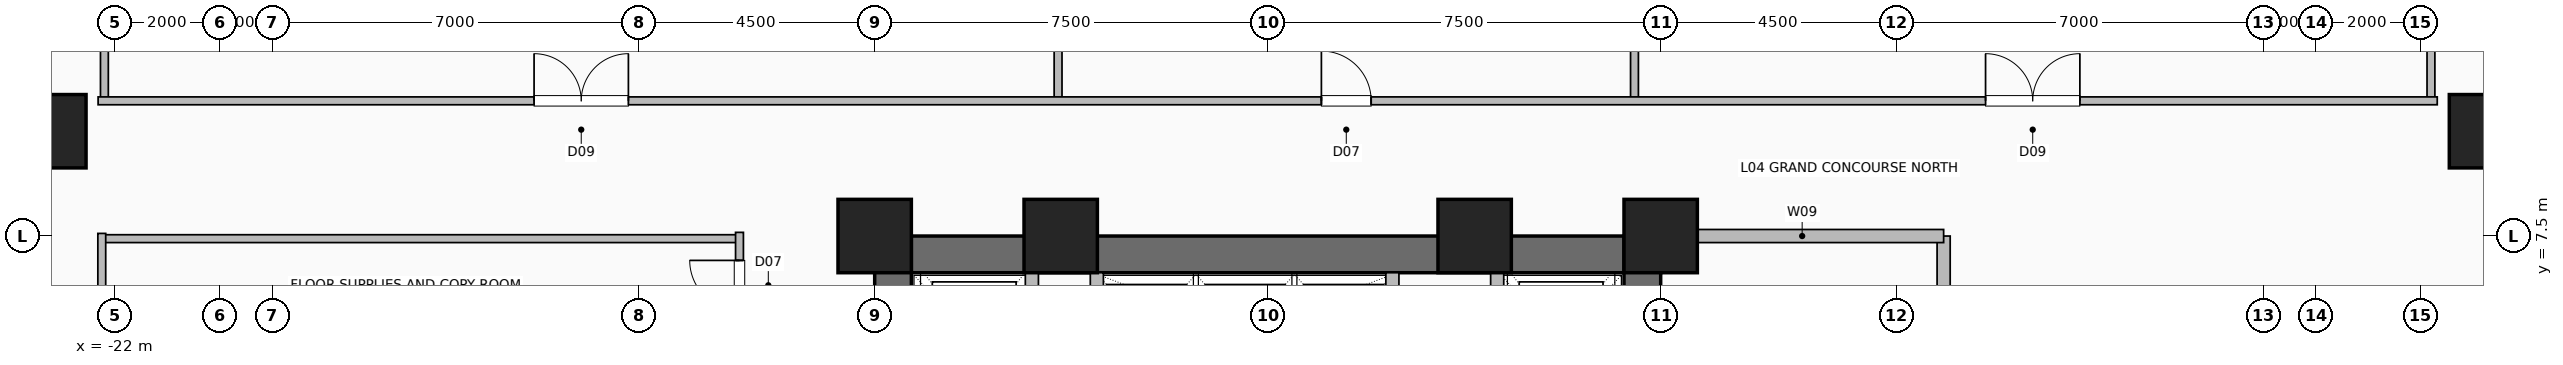
"""IFC4 building model, lengths in metres.
Left out: names, types, materials, properties, quantities, classifications, styles, units other than length and angle.
Written with IfcOpenShell. Run it as: python <this file> out.ifc"""

import sys

from ifc_helpers import new_model, si_unit, direction, frame, frame_2d, origin, origin_2d, place, context, subcontext, project, spatial, rectangle, hollow_rectangle, extrude, element, fill, save


model = new_model("IFC4")
c1 = context("Model", 3, precision=1e-05, world=origin(), true_north=direction((0.0, 1.0)))
c2 = subcontext(c1, "Body", "Model", "MODEL_VIEW")
j1 = project(units=[si_unit("LENGTHUNIT", "METRE"), si_unit("PLANEANGLEUNIT", "RADIAN")], contexts=[c1])
p1 = place(None, origin())
s1 = spatial("IfcSite", under=j1, at=p1, CompositionType="ELEMENT")
p2 = place(p1, origin())
s2 = spatial("IfcBuilding", under=s1, at=p2, CompositionType="ELEMENT")
p3 = place(p2, frame((0.0, 0.0, 21.6)))
s3 = spatial("IfcBuildingStorey", under=s2, at=p3, CompositionType="ELEMENT", Elevation=21.6)
for number, where, z_axis, x_axis in (
    (1, (7.5, 7.5, 0.0), (0.0, 0.0, 1.0), (1.0, 0.0, 0.0)),
    (2, (3.95, 7.5, 0.0), (0.0, 0.0, 1.0), (1.0, 0.0, 0.0)),
    (3, (-3.95, 7.5, 0.0), (0.0, 0.0, 1.0), (1.0, 0.0, 0.0)),
    (4, (-7.5, 7.5, 0.0), (0.0, 0.0, 1.0), (1.0, 0.0, 0.0)),
):
    element("IfcColumn", number, at=place(p3, frame(where, z_axis=z_axis, x_axis=x_axis)), inside=s3, PredefinedType="COLUMN", context=c2, shape_type="SweptSolid", body=[
        extrude(hollow_rectangle(XDim=1.4, YDim=1.4, WallThickness=0.06, at=origin_2d()), origin(), (0.0, 0.0, 1.0), 5.4),
    ])
for number, where, z_axis, x_axis in (
    (5, (-23.25, 9.5, 0.0), (0.0, 0.0, 1.0), (1.0, 0.0, 0.0)),
    (6, (23.25, 9.5, 0.0), (0.0, 0.0, 1.0), (1.0, 0.0, 0.0)),
):
    element("IfcColumn", number, at=place(p3, frame(where, z_axis=z_axis, x_axis=x_axis)), inside=s3, PredefinedType="COLUMN", context=c2, shape_type="SweptSolid", body=[
        extrude(hollow_rectangle(XDim=1.4, YDim=1.4, WallThickness=0.06, at=origin_2d()), origin(), (0.0, 0.0, 1.0), 5.0),
    ])
p4 = place(p3, frame((-7.5, 7.15, 0.0), z_axis=(0.0, 0.0, 1.0), x_axis=(1.0, 0.0, 0.0)))
e7 = element("IfcWall", 7, at=p4, inside=s3, PredefinedType="SHEAR", context=c2, shape_type="SweptSolid", body=[
    extrude(rectangle(XDim=15.0, YDim=0.7, at=frame_2d((7.5, 0.0))), origin(), (0.0, 0.0, 1.0), 5.0),
])
p5 = place(p3, frame((-7.15, -7.5, 0.0), z_axis=(0.0, 0.0, 1.0), x_axis=(0.0, 1.0, 0.0)))
e8 = element("IfcWall", 8, at=p5, inside=s3, PredefinedType="SHEAR", context=c2, shape_type="SweptSolid", body=[
    extrude(rectangle(XDim=15.0, YDim=0.7, at=frame_2d((7.5, 0.0))), origin(), (0.0, 0.0, 1.0), 5.0),
])
p6 = place(p5, frame((9.5, 0.0, 0.0)))
e9 = element("IfcOpeningElement", 9, at=p6, cuts=e8, PredefinedType="OPENING", context=c2, shape_type="SweptSolid", body=[
    extrude(rectangle(XDim=1.0, YDim=2.08, at=frame_2d((0.5, 1.04))), frame((0.0, 0.36, 0.0), z_axis=(0.0, -1.0, 0.0), x_axis=(1.0, 0.0, 0.0)), (0.0, 0.0, 1.0), 0.72),
])
p7 = place(p3, frame((7.15, -7.5, 0.0), z_axis=(0.0, 0.0, 1.0), x_axis=(0.0, 1.0, 0.0)))
e10 = element("IfcWall", 10, at=p7, inside=s3, PredefinedType="SHEAR", context=c2, shape_type="SweptSolid", body=[
    extrude(rectangle(XDim=15.0, YDim=0.7, at=frame_2d((7.5, 0.0))), origin(), (0.0, 0.0, 1.0), 5.0),
])
p8 = place(p7, frame((12.6, 0.0, 0.0)))
e11 = element("IfcOpeningElement", 11, at=p8, cuts=e10, PredefinedType="OPENING", context=c2, shape_type="SweptSolid", body=[
    extrude(rectangle(XDim=1.2, YDim=2.2, at=frame_2d((0.6, 1.1))), frame((0.0, 0.36, 0.0), z_axis=(0.0, -1.0, 0.0), x_axis=(1.0, 0.0, 0.0)), (0.0, 0.0, 1.0), 0.72),
])
for number, where, z_axis, x_axis in (
    (12, (-3.26, 4.58, 0.0), (0.0, 0.0, 1.0), (0.0, 1.0, 0.0)),
    (13, (2.38, 4.58, 0.0), (0.0, 0.0, 1.0), (0.0, 1.0, 0.0)),
):
    element("IfcWall", number, at=place(p3, frame(where, z_axis=z_axis, x_axis=x_axis)), inside=s3, PredefinedType="SHEAR", context=c2, shape_type="SweptSolid", body=[
        extrude(rectangle(XDim=2.22, YDim=0.25, at=frame_2d((1.11, 0.0))), origin(), (0.0, 0.0, 1.0), 5.0),
    ])
p9 = place(p3, frame((-4.5, 4.35, 0.0), z_axis=(0.0, 0.0, 1.0), x_axis=(0.0, 1.0, 0.0)))
e14 = element("IfcWall", 14, at=p9, inside=s3, PredefinedType="SHEAR", context=c2, shape_type="SweptSolid", body=[
    extrude(rectangle(XDim=2.85, YDim=0.25, at=frame_2d((1.425, 0.0))), origin(), (0.0, 0.0, 1.0), 5.0),
])
p10 = place(p3, frame((4.38, 4.3, 0.0), z_axis=(0.0, 0.0, 1.0), x_axis=(0.0, 1.0, 0.0)))
e15 = element("IfcWall", 15, at=p10, inside=s3, PredefinedType="SHEAR", context=c2, shape_type="SweptSolid", body=[
    extrude(rectangle(XDim=2.5, YDim=0.25, at=frame_2d((1.25, 0.0))), origin(), (0.0, 0.0, 1.0), 5.0),
])
p11 = place(p3, frame((12.9, 1.75, 0.0), z_axis=(0.0, 0.0, 1.0), x_axis=(0.0, 1.0, 0.0)))
e16 = element("IfcWall", 16, at=p11, inside=s3, PredefinedType="SHEAR", context=c2, shape_type="SweptSolid", body=[
    extrude(rectangle(XDim=5.75, YDim=0.25, at=frame_2d((2.875, 0.0))), origin(), (0.0, 0.0, 1.0), 5.0),
])
p12 = place(p11, frame((1.8, 0.0, 0.0)))
e17 = element("IfcOpeningElement", 17, at=p12, cuts=e16, PredefinedType="OPENING", context=c2, shape_type="SweptSolid", body=[
    extrude(rectangle(XDim=1.0, YDim=2.08, at=frame_2d((0.5, 1.04))), frame((0.0, 0.135, 0.0), z_axis=(0.0, -1.0, 0.0), x_axis=(1.0, 0.0, 0.0)), (0.0, 0.0, 1.0), 0.27),
])
p13 = place(p3, frame((7.5, 7.5, 0.0), z_axis=(0.0, 0.0, 1.0), x_axis=(1.0, 0.0, 0.0)))
e18 = element("IfcWall", 18, at=p13, inside=s3, PredefinedType="SHEAR", context=c2, shape_type="SweptSolid", body=[
    extrude(rectangle(XDim=5.4, YDim=0.25, at=frame_2d((2.7, 0.0))), origin(), (0.0, 0.0, 1.0), 3.375),
])
p14 = place(p3, frame((-22.2, 10.08, 0.0), z_axis=(0.0, 0.0, 1.0), x_axis=(0.0, 1.0, 0.0)))
e19 = element("IfcWall", 19, at=p14, inside=s3, PredefinedType="PARTITIONING", context=c2, shape_type="SweptSolid", body=[
    extrude(rectangle(XDim=12.12, YDim=0.15, at=frame_2d((6.06, 0.0))), origin(), (0.0, 0.0, 1.0), 5.0),
])
p15 = place(p3, frame((-4.0, 10.08, 0.0), z_axis=(0.0, 0.0, 1.0), x_axis=(0.0, 1.0, 0.0)))
e20 = element("IfcWall", 20, at=p15, inside=s3, PredefinedType="PARTITIONING", context=c2, shape_type="SweptSolid", body=[
    extrude(rectangle(XDim=12.12, YDim=0.15, at=frame_2d((6.06, 0.0))), origin(), (0.0, 0.0, 1.0), 3.375),
])
for number, where, z_axis, x_axis in (
    (21, (7.0, 10.08, 0.0), (0.0, 0.0, 1.0), (0.0, 1.0, 0.0)),
    (22, (22.2, 10.08, 0.0), (0.0, 0.0, 1.0), (0.0, 1.0, 0.0)),
):
    element("IfcWall", number, at=place(p3, frame(where, z_axis=z_axis, x_axis=x_axis)), inside=s3, PredefinedType="PARTITIONING", context=c2, shape_type="SweptSolid", body=[
        extrude(rectangle(XDim=12.12, YDim=0.15, at=frame_2d((6.06, 0.0))), origin(), (0.0, 0.0, 1.0), 5.0),
    ])
p16 = place(p3, frame((-22.32, 10.08, 0.0), z_axis=(0.0, 0.0, 1.0), x_axis=(1.0, 0.0, 0.0)))
e23 = element("IfcWall", 23, at=p16, inside=s3, PredefinedType="PARTITIONING", context=c2, shape_type="SweptSolid", body=[
    extrude(rectangle(XDim=44.64, YDim=0.15, at=frame_2d((22.32, 0.0))), origin(), (0.0, 0.0, 1.0), 5.0),
])
p17 = place(p16, frame((8.32, 0.0, 0.0)))
e24 = element("IfcOpeningElement", 24, at=p17, cuts=e23, PredefinedType="OPENING", context=c2, shape_type="SweptSolid", body=[
    extrude(rectangle(XDim=1.8, YDim=2.08, at=frame_2d((0.9, 1.04))), frame((0.0, 0.085, 0.0), z_axis=(0.0, -1.0, 0.0), x_axis=(1.0, 0.0, 0.0)), (0.0, 0.0, 1.0), 0.17),
])
p18 = place(p16, frame((23.345, 0.0, 0.0)))
e25 = element("IfcOpeningElement", 25, at=p18, cuts=e23, PredefinedType="OPENING", context=c2, shape_type="SweptSolid", body=[
    extrude(rectangle(XDim=0.95, YDim=2.06, at=frame_2d((0.475, 1.03))), frame((0.0, 0.085, 0.0), z_axis=(0.0, -1.0, 0.0), x_axis=(1.0, 0.0, 0.0)), (0.0, 0.0, 1.0), 0.17),
])
p19 = place(p16, frame((36.02, 0.0, 0.0)))
e26 = element("IfcOpeningElement", 26, at=p19, cuts=e23, PredefinedType="OPENING", context=c2, shape_type="SweptSolid", body=[
    extrude(rectangle(XDim=1.8, YDim=2.08, at=frame_2d((0.9, 1.04))), frame((0.0, 0.085, 0.0), z_axis=(0.0, -1.0, 0.0), x_axis=(1.0, 0.0, 0.0)), (0.0, 0.0, 1.0), 0.17),
])
p20 = place(p3, frame((-22.25, 7.45, 0.0), z_axis=(0.0, 0.0, 1.0), x_axis=(1.0, 0.0, 0.0)))
e27 = element("IfcWall", 27, at=p20, inside=s3, PredefinedType="PARTITIONING", context=c2, shape_type="SweptSolid", body=[
    extrude(rectangle(XDim=12.17, YDim=0.15, at=frame_2d((6.085, 0.0))), origin(), (0.0, 0.0, 1.0), 5.0),
])
p21 = place(p3, frame((-10.08, -7.57, 0.0), z_axis=(0.0, 0.0, 1.0), x_axis=(0.0, 1.0, 0.0)))
e28 = element("IfcWall", 28, at=p21, inside=s3, PredefinedType="PARTITIONING", context=c2, shape_type="SweptSolid", body=[
    extrude(rectangle(XDim=15.14, YDim=0.15, at=frame_2d((7.57, 0.0))), origin(), (0.0, 0.0, 1.0), 5.0),
])
p22 = place(p21, frame((2.37, 0.0, 0.0)))
e29 = element("IfcOpeningElement", 29, at=p22, cuts=e28, PredefinedType="OPENING", context=c2, shape_type="SweptSolid", body=[
    extrude(rectangle(XDim=0.95, YDim=2.06, at=frame_2d((0.475, 1.03))), frame((0.0, 0.085, 0.0), z_axis=(0.0, -1.0, 0.0), x_axis=(1.0, 0.0, 0.0)), (0.0, 0.0, 1.0), 0.17),
])
p23 = place(p21, frame((5.875, 0.0, 0.0)))
e30 = element("IfcOpeningElement", 30, at=p23, cuts=e28, PredefinedType="OPENING", context=c2, shape_type="SweptSolid", body=[
    extrude(rectangle(XDim=0.85, YDim=2.05, at=frame_2d((0.425, 1.025))), frame((0.0, 0.085, 0.0), z_axis=(0.0, -1.0, 0.0), x_axis=(1.0, 0.0, 0.0)), (0.0, 0.0, 1.0), 0.17),
])
p24 = place(p21, frame((8.925, 0.0, 0.0)))
e31 = element("IfcOpeningElement", 31, at=p24, cuts=e28, PredefinedType="OPENING", context=c2, shape_type="SweptSolid", body=[
    extrude(rectangle(XDim=0.95, YDim=2.06, at=frame_2d((0.475, 1.03))), frame((0.0, 0.085, 0.0), z_axis=(0.0, -1.0, 0.0), x_axis=(1.0, 0.0, 0.0)), (0.0, 0.0, 1.0), 0.17),
])
p25 = place(p21, frame((12.08, 0.0, 0.0)))
e32 = element("IfcOpeningElement", 32, at=p25, cuts=e28, PredefinedType="OPENING", context=c2, shape_type="SweptSolid", body=[
    extrude(rectangle(XDim=0.85, YDim=2.05, at=frame_2d((0.425, 1.025))), frame((0.0, 0.085, 0.0), z_axis=(0.0, -1.0, 0.0), x_axis=(1.0, 0.0, 0.0)), (0.0, 0.0, 1.0), 0.17),
])
p26 = place(p21, frame((13.655, 0.0, 0.0)))
e33 = element("IfcOpeningElement", 33, at=p26, cuts=e28, PredefinedType="OPENING", context=c2, shape_type="SweptSolid", body=[
    extrude(rectangle(XDim=0.95, YDim=2.06, at=frame_2d((0.475, 1.03))), frame((0.0, 0.085, 0.0), z_axis=(0.0, -1.0, 0.0), x_axis=(1.0, 0.0, 0.0)), (0.0, 0.0, 1.0), 0.17),
])
p27 = place(p3, frame((-22.25, -7.55, 0.0), z_axis=(0.0, 0.0, 1.0), x_axis=(0.0, 1.0, 0.0)))
e34 = element("IfcWall", 34, at=p27, inside=s3, PredefinedType="PARTITIONING", context=c2, shape_type="SweptSolid", body=[
    extrude(rectangle(XDim=15.1, YDim=0.15, at=frame_2d((7.55, 0.0))), origin(), (0.0, 0.0, 1.0), 5.0),
])
p28 = place(p17, origin())
e35 = element("IfcDoor", 35, at=p28, inside=s3, OperationType="DOUBLE_DOOR_SINGLE_SWING", PredefinedType="DOOR", context=c2, shape_type="SweptSolid", body=[
    extrude(rectangle(XDim=1.8, YDim=2.08, at=frame_2d((0.9, 1.04))), frame((0.0, 0.025, 0.0), z_axis=(0.0, -1.0, 0.0), x_axis=(1.0, 0.0, 0.0)), (0.0, 0.0, 1.0), 0.05),
])
fill(e24, e35)
p29 = place(p18, origin())
e36 = element("IfcDoor", 36, at=p29, inside=s3, OperationType="SINGLE_SWING_LEFT", PredefinedType="DOOR", context=c2, shape_type="SweptSolid", body=[
    extrude(rectangle(XDim=0.95, YDim=2.06, at=frame_2d((0.475, 1.03))), frame((0.0, 0.025, 0.0), z_axis=(0.0, -1.0, 0.0), x_axis=(1.0, 0.0, 0.0)), (0.0, 0.0, 1.0), 0.05),
])
fill(e25, e36)
p30 = place(p19, origin())
e37 = element("IfcDoor", 37, at=p30, inside=s3, OperationType="DOUBLE_DOOR_SINGLE_SWING", PredefinedType="DOOR", context=c2, shape_type="SweptSolid", body=[
    extrude(rectangle(XDim=1.8, YDim=2.08, at=frame_2d((0.9, 1.04))), frame((0.0, 0.025, 0.0), z_axis=(0.0, -1.0, 0.0), x_axis=(1.0, 0.0, 0.0)), (0.0, 0.0, 1.0), 0.05),
])
fill(e26, e37)
p31 = place(p26, origin())
e38 = element("IfcDoor", 38, at=p31, inside=s3, OperationType="SINGLE_SWING_RIGHT", PredefinedType="DOOR", context=c2, shape_type="SweptSolid", body=[
    extrude(rectangle(XDim=0.95, YDim=2.06, at=frame_2d((0.475, 1.03))), frame((0.0, 0.025, 0.0), z_axis=(0.0, -1.0, 0.0), x_axis=(1.0, 0.0, 0.0)), (0.0, 0.0, 1.0), 0.05),
])
fill(e33, e38)
save(model, sys.argv[1])
